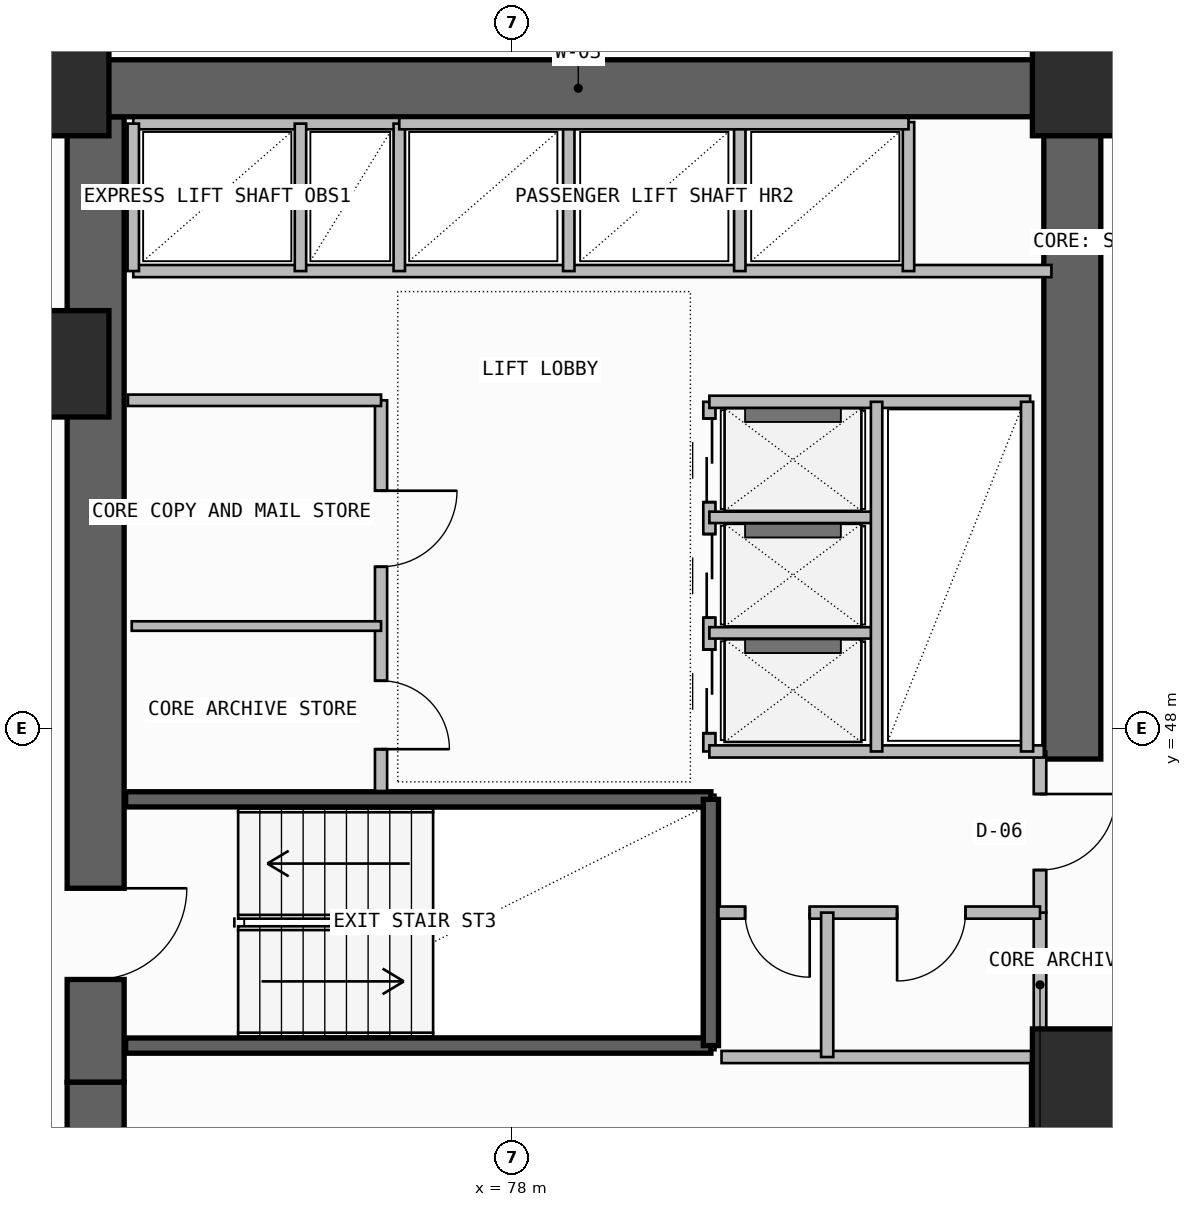
"""IFC4 building model, lengths in metres.
Left out: names, types, materials, properties, quantities, classifications, styles, units other than length and angle.
Written with IfcOpenShell. Run it as: python <this file> out.ifc"""

import sys

from ifc_helpers import new_model, si_unit, direction, frame, frame_2d, origin, origin_2d, place, context, subcontext, project, spatial, rectangle, extrude, element, fill, save


model = new_model("IFC4")
c1 = context("Model", 3, precision=1e-05, world=origin(), true_north=direction((0.0, 1.0)))
c2 = subcontext(c1, "Body", "Model", "MODEL_VIEW")
j1 = project(units=[si_unit("LENGTHUNIT", "METRE"), si_unit("PLANEANGLEUNIT", "RADIAN")], contexts=[c1])
p1 = place(None, origin())
s1 = spatial("IfcSite", under=j1, at=p1, CompositionType="ELEMENT")
p2 = place(p1, origin())
s2 = spatial("IfcBuilding", under=s1, at=p2, CompositionType="ELEMENT")
p3 = place(p2, frame((0.0, 0.0, 182.62)))
s3 = spatial("IfcBuildingStorey", under=s2, at=p3, CompositionType="ELEMENT", Elevation=182.62)
p4 = place(p3, frame((72.525, 35.5, -0.26), z_axis=(0.0, 0.0, 1.0), x_axis=(0.0, 1.0, 0.0)))
e1 = element("IfcWall", 1, at=p4, inside=s3, PredefinedType="SHEAR", context=c2, shape_type="SweptSolid", body=[
    extrude(rectangle(XDim=7.85, YDim=0.75, at=frame_2d((3.925, 0.0))), origin(), (0.0, 0.0, 1.0), 3.52),
])
p5 = place(p4, frame((1.45, 0.0, 0.26)))
e2 = element("IfcOpeningElement", 2, at=p5, cuts=e1, PredefinedType="OPENING", context=c2, shape_type="SweptSolid", body=[
    extrude(rectangle(XDim=1.2, YDim=2.2, at=frame_2d((0.6, 1.1))), frame((0.0, 0.385, 0.0), z_axis=(0.0, -1.0, 0.0), x_axis=(1.0, 0.0, 0.0)), (0.0, 0.0, 1.0), 0.77),
])
p6 = place(p3, frame((72.525, 43.35, -0.26), z_axis=(0.0, 0.0, 1.0), x_axis=(0.0, 1.0, 0.0)))
e3 = element("IfcWall", 3, at=p6, inside=s3, PredefinedType="SHEAR", context=c2, shape_type="SweptSolid", body=[
    extrude(rectangle(XDim=12.7, YDim=0.75, at=frame_2d((6.35, 0.0))), origin(), (0.0, 0.0, 1.0), 3.52),
])
p7 = place(p6, frame((1.35, 0.0, 0.26)))
e4 = element("IfcOpeningElement", 4, at=p7, cuts=e3, PredefinedType="OPENING", context=c2, shape_type="SweptSolid", body=[
    extrude(rectangle(XDim=1.2, YDim=2.2, at=frame_2d((0.6, 1.1))), frame((0.0, 0.385, 0.0), z_axis=(0.0, -1.0, 0.0), x_axis=(1.0, 0.0, 0.0)), (0.0, 0.0, 1.0), 0.77),
])
p8 = place(p3, frame((72.0, 56.425, -0.26), z_axis=(0.0, 0.0, 1.0), x_axis=(1.0, 0.0, 0.0)))
e5 = element("IfcWall", 5, at=p8, inside=s3, PredefinedType="SHEAR", context=c2, shape_type="SweptSolid", body=[
    extrude(rectangle(XDim=13.75, YDim=0.75, at=frame_2d((6.875, 0.0))), origin(), (0.0, 0.0, 1.0), 3.52),
])
p9 = place(p3, frame((85.375, 47.6, -0.26), z_axis=(0.0, 0.0, 1.0), x_axis=(0.0, 1.0, 0.0)))
e6 = element("IfcWall", 6, at=p9, inside=s3, PredefinedType="SHEAR", context=c2, shape_type="SweptSolid", body=[
    extrude(rectangle(XDim=8.45, YDim=0.75, at=frame_2d((4.225, 0.0))), origin(), (0.0, 0.0, 1.0), 3.52),
])
for number, where, z_axis, x_axis in (
    (7, (85.55, 43.35, 0.0), (0.0, 0.0, 1.0), (1.0, 0.0, 0.0)),
    (8, (72.0, 52.8, 0.0), (0.0, 0.0, 1.0), (1.0, 0.0, 0.0)),
    (9, (72.0, 56.5, 0.0), (0.0, 0.0, 1.0), (1.0, 0.0, 0.0)),
    (10, (85.55, 56.5, 0.0), (0.0, 0.0, 1.0), (1.0, 0.0, 0.0)),
):
    element("IfcColumn", number, at=place(p3, frame(where, z_axis=z_axis, x_axis=x_axis)), inside=s3, PredefinedType="COLUMN", context=c2, shape_type="SweptSolid", body=[
        extrude(rectangle(XDim=1.4, YDim=1.4, at=origin_2d()), origin(), (0.0, 0.0, 1.0), 3.52),
    ])
p10 = place(p3, frame((84.92, 38.85, 0.0), z_axis=(0.0, 0.0, 1.0), x_axis=(0.0, 1.0, 0.0)))
e11 = element("IfcWall", 11, at=p10, inside=s3, PredefinedType="SOLIDWALL", context=c2, shape_type="SweptSolid", body=[
    extrude(rectangle(XDim=4.83, YDim=0.2, at=frame_2d((2.415, 0.0))), origin(), (0.0, 0.0, 1.0), 3.26),
])
p11 = place(p10, frame((1.25, 0.0, 0.0)))
e12 = element("IfcOpeningElement", 12, at=p11, cuts=e11, PredefinedType="OPENING", context=c2, shape_type="SweptSolid", body=[
    extrude(rectangle(XDim=1.1, YDim=2.2, at=frame_2d((0.55, 1.1))), frame((0.0, 0.11, 0.0), z_axis=(0.0, -1.0, 0.0), x_axis=(1.0, 0.0, 0.0)), (0.0, 0.0, 1.0), 0.22),
])
for number, where, z_axis, x_axis in (
    (13, (72.92, 43.83, -0.26), (0.0, 0.0, 1.0), (1.0, 0.0, 0.0)),
    (14, (72.92, 47.07, -0.26), (0.0, 0.0, 1.0), (1.0, 0.0, 0.0)),
):
    element("IfcWall", number, at=place(p3, frame(where, z_axis=z_axis, x_axis=x_axis)), inside=s3, PredefinedType="SOLIDWALL", context=c2, shape_type="SweptSolid", body=[
        extrude(rectangle(XDim=7.7, YDim=0.2, at=frame_2d((3.85, 0.0))), origin(), (0.0, 0.0, 1.0), 3.52),
    ])
p12 = place(p3, frame((80.62, 43.83, -0.26), z_axis=(0.0, 0.0, 1.0), x_axis=(0.0, 1.0, 0.0)))
e15 = element("IfcWall", 15, at=p12, inside=s3, PredefinedType="SOLIDWALL", context=c2, shape_type="SweptSolid", body=[
    extrude(rectangle(XDim=3.24, YDim=0.2, at=frame_2d((1.62, 0.0))), origin(), (0.0, 0.0, 1.0), 3.52),
])
p13 = place(p3, frame((84.95, 43.68, 0.0), z_axis=(0.0, 0.0, 1.0), x_axis=(0.0, 1.0, 0.0)))
e16 = element("IfcWall", 16, at=p13, inside=s3, PredefinedType="PLUMBINGWALL", context=c2, shape_type="SweptSolid", body=[
    extrude(rectangle(XDim=1.9, YDim=0.165, at=frame_2d((0.95, 0.0))), origin(), (0.0, 0.0, 1.0), 3.26),
])
p14 = place(p3, frame((84.95, 45.58, 0.0), z_axis=(0.0, 0.0, 1.0), x_axis=(0.0, 1.0, 0.0)))
e17 = element("IfcWall", 17, at=p14, inside=s3, PredefinedType="PARTITIONING", context=c2, shape_type="SweptSolid", body=[
    extrude(rectangle(XDim=2.12, YDim=0.165, at=frame_2d((1.06, 0.0))), origin(), (0.0, 0.0, 1.0), 3.26),
])
p15 = place(p14, frame((0.56, 0.0, 0.0)))
e18 = element("IfcOpeningElement", 18, at=p15, cuts=e17, PredefinedType="OPENING", context=c2, shape_type="SweptSolid", body=[
    extrude(rectangle(XDim=1.0, YDim=2.2, at=frame_2d((0.5, 1.1))), frame((0.0, 0.093, 0.0), z_axis=(0.0, -1.0, 0.0), x_axis=(1.0, 0.0, 0.0)), (0.0, 0.0, 1.0), 0.185),
])
p16 = place(p3, frame((80.72, 45.58, 0.0), z_axis=(0.0, 0.0, 1.0), x_axis=(1.0, 0.0, 0.0)))
e19 = element("IfcWall", 19, at=p16, inside=s3, PredefinedType="PLUMBINGWALL", context=c2, shape_type="SweptSolid", body=[
    extrude(rectangle(XDim=4.23, YDim=0.16, at=frame_2d((2.115, 0.0))), origin(), (0.0, 0.0, 1.0), 3.26),
])
p17 = place(p16, frame((0.35, 0.0, 0.0)))
e20 = element("IfcOpeningElement", 20, at=p17, cuts=e19, PredefinedType="OPENING", context=c2, shape_type="SweptSolid", body=[
    extrude(rectangle(XDim=0.85, YDim=2.05, at=frame_2d((0.425, 1.025))), frame((0.0, 0.09, 0.0), z_axis=(0.0, -1.0, 0.0), x_axis=(1.0, 0.0, 0.0)), (0.0, 0.0, 1.0), 0.18),
])
p18 = place(p16, frame((2.35, 0.0, 0.0)))
e21 = element("IfcOpeningElement", 21, at=p18, cuts=e19, PredefinedType="OPENING", context=c2, shape_type="SweptSolid", body=[
    extrude(rectangle(XDim=0.9, YDim=2.1, at=frame_2d((0.45, 1.05))), frame((0.0, 0.09, 0.0), z_axis=(0.0, -1.0, 0.0), x_axis=(1.0, 0.0, 0.0)), (0.0, 0.0, 1.0), 0.18),
])
p19 = place(p3, frame((80.76, 43.68, 0.0), z_axis=(0.0, 0.0, 1.0), x_axis=(1.0, 0.0, 0.0)))
e22 = element("IfcWall", 22, at=p19, inside=s3, PredefinedType="PLUMBINGWALL", context=c2, shape_type="SweptSolid", body=[
    extrude(rectangle(XDim=4.19, YDim=0.16, at=frame_2d((2.095, 0.0))), origin(), (0.0, 0.0, 1.0), 3.26),
])
p20 = place(p3, frame((82.15, 43.68, 0.0), z_axis=(0.0, 0.0, 1.0), x_axis=(0.0, 1.0, 0.0)))
e23 = element("IfcWall", 23, at=p20, inside=s3, PredefinedType="PLUMBINGWALL", context=c2, shape_type="SweptSolid", body=[
    extrude(rectangle(XDim=1.9, YDim=0.16, at=frame_2d((0.95, 0.0))), origin(), (0.0, 0.0, 1.0), 3.26),
])
p21 = place(p3, frame((76.28, 47.18, 0.0), z_axis=(0.0, 0.0, 1.0), x_axis=(0.0, 1.0, 0.0)))
e24 = element("IfcWall", 24, at=p21, inside=s3, PredefinedType="SOLIDWALL", context=c2, shape_type="SweptSolid", body=[
    extrude(rectangle(XDim=5.14, YDim=0.16, at=frame_2d((2.57, 0.0))), origin(), (0.0, 0.0, 1.0), 3.26),
])
p22 = place(p21, frame((0.55, 0.0, 0.0)))
e25 = element("IfcOpeningElement", 25, at=p22, cuts=e24, PredefinedType="OPENING", context=c2, shape_type="SweptSolid", body=[
    extrude(rectangle(XDim=0.9, YDim=2.1, at=frame_2d((0.45, 1.05))), frame((0.0, 0.09, 0.0), z_axis=(0.0, -1.0, 0.0), x_axis=(1.0, 0.0, 0.0)), (0.0, 0.0, 1.0), 0.18),
])
p23 = place(p21, frame((2.95, 0.0, 0.0)))
e26 = element("IfcOpeningElement", 26, at=p23, cuts=e24, PredefinedType="OPENING", context=c2, shape_type="SweptSolid", body=[
    extrude(rectangle(XDim=1.0, YDim=2.2, at=frame_2d((0.5, 1.1))), frame((0.0, 0.09, 0.0), z_axis=(0.0, -1.0, 0.0), x_axis=(1.0, 0.0, 0.0)), (0.0, 0.0, 1.0), 0.18),
])
p24 = place(p3, frame((72.95, 52.32, 0.0), z_axis=(0.0, 0.0, 1.0), x_axis=(1.0, 0.0, 0.0)))
e27 = element("IfcWall", 27, at=p24, inside=s3, PredefinedType="SOLIDWALL", context=c2, shape_type="SweptSolid", body=[
    extrude(rectangle(XDim=3.33, YDim=0.15, at=frame_2d((1.665, 0.0))), origin(), (0.0, 0.0, 1.0), 3.26),
])
p25 = place(p3, frame((73.0, 49.35, 0.0), z_axis=(0.0, 0.0, 1.0), x_axis=(1.0, 0.0, 0.0)))
e28 = element("IfcWall", 28, at=p25, inside=s3, PredefinedType="PARTITIONING", context=c2, shape_type="SweptSolid", body=[
    extrude(rectangle(XDim=3.28, YDim=0.125, at=frame_2d((1.64, 0.0))), origin(), (0.0, 0.0, 1.0), 3.26),
])
p26 = place(p3, frame((80.6, 47.7, 0.0), z_axis=(0.0, 0.0, 1.0), x_axis=(0.0, 1.0, 0.0)))
e29 = element("IfcWall", 29, at=p26, inside=s3, PredefinedType="SOLIDWALL", context=c2, shape_type="SweptSolid", body=[
    extrude(rectangle(XDim=4.6, YDim=0.16, at=frame_2d((2.3, 0.0))), origin(), (0.0, 0.0, 1.0), 3.26),
])
p27 = place(p26, frame((0.24, 0.0, 0.0)))
e30 = element("IfcOpeningElement", 30, at=p27, cuts=e29, PredefinedType="OPENING", context=c2, shape_type="SweptSolid", body=[
    extrude(rectangle(XDim=1.1, YDim=2.25, at=frame_2d((0.55, 1.125))), frame((0.0, 0.09, 0.0), z_axis=(0.0, -1.0, 0.0), x_axis=(1.0, 0.0, 0.0)), (0.0, 0.0, 1.0), 0.18),
])
p28 = place(p26, frame((1.76, 0.0, 0.0)))
e31 = element("IfcOpeningElement", 31, at=p28, cuts=e29, PredefinedType="OPENING", context=c2, shape_type="SweptSolid", body=[
    extrude(rectangle(XDim=1.1, YDim=2.25, at=frame_2d((0.55, 1.125))), frame((0.0, 0.09, 0.0), z_axis=(0.0, -1.0, 0.0), x_axis=(1.0, 0.0, 0.0)), (0.0, 0.0, 1.0), 0.18),
])
p29 = place(p26, frame((3.28, 0.0, 0.0)))
e32 = element("IfcOpeningElement", 32, at=p29, cuts=e29, PredefinedType="OPENING", context=c2, shape_type="SweptSolid", body=[
    extrude(rectangle(XDim=1.1, YDim=2.25, at=frame_2d((0.55, 1.125))), frame((0.0, 0.09, 0.0), z_axis=(0.0, -1.0, 0.0), x_axis=(1.0, 0.0, 0.0)), (0.0, 0.0, 1.0), 0.18),
])
p30 = place(p3, frame((80.6, 47.7, 0.0), z_axis=(0.0, 0.0, 1.0), x_axis=(1.0, 0.0, 0.0)))
e33 = element("IfcWall", 33, at=p30, inside=s3, PredefinedType="SOLIDWALL", context=c2, shape_type="SweptSolid", body=[
    extrude(rectangle(XDim=4.4, YDim=0.16, at=frame_2d((2.2, 0.0))), origin(), (0.0, 0.0, 1.0), 3.26),
])
p31 = place(p3, frame((80.6, 52.3, 0.0), z_axis=(0.0, 0.0, 1.0), x_axis=(1.0, 0.0, 0.0)))
e34 = element("IfcWall", 34, at=p31, inside=s3, PredefinedType="SOLIDWALL", context=c2, shape_type="SweptSolid", body=[
    extrude(rectangle(XDim=4.22, YDim=0.16, at=frame_2d((2.11, 0.0))), origin(), (0.0, 0.0, 1.0), 3.26),
])
for number, where, z_axis, x_axis in (
    (35, (80.6, 49.26, 0.0), (0.0, 0.0, 1.0), (1.0, 0.0, 0.0)),
    (36, (80.6, 50.78, 0.0), (0.0, 0.0, 1.0), (1.0, 0.0, 0.0)),
):
    element("IfcWall", number, at=place(p3, frame(where, z_axis=z_axis, x_axis=x_axis)), inside=s3, PredefinedType="PLUMBINGWALL", context=c2, shape_type="SweptSolid", body=[
        extrude(rectangle(XDim=2.2, YDim=0.15, at=frame_2d((1.1, 0.0))), origin(), (0.0, 0.0, 1.0), 3.26),
    ])
p32 = place(p3, frame((82.8, 47.7, 0.0), z_axis=(0.0, 0.0, 1.0), x_axis=(0.0, 1.0, 0.0)))
e37 = element("IfcWall", 37, at=p32, inside=s3, PredefinedType="PLUMBINGWALL", context=c2, shape_type="SweptSolid", body=[
    extrude(rectangle(XDim=4.6, YDim=0.15, at=frame_2d((2.3, 0.0))), origin(), (0.0, 0.0, 1.0), 3.26),
])
p33 = place(p3, frame((84.78, 47.7, 0.0), z_axis=(0.0, 0.0, 1.0), x_axis=(0.0, 1.0, 0.0)))
e38 = element("IfcWall", 38, at=p33, inside=s3, PredefinedType="SOLIDWALL", context=c2, shape_type="SweptSolid", body=[
    extrude(rectangle(XDim=4.6, YDim=0.16, at=frame_2d((2.3, 0.0))), origin(), (0.0, 0.0, 1.0), 3.26),
])
p34 = place(p3, frame((73.02, 54.02, 0.0), z_axis=(0.0, 0.0, 1.0), x_axis=(1.0, 0.0, 0.0)))
e39 = element("IfcWall", 39, at=p34, inside=s3, PredefinedType="SOLIDWALL", context=c2, shape_type="SweptSolid", body=[
    extrude(rectangle(XDim=12.08, YDim=0.16, at=frame_2d((6.04, 0.0))), origin(), (0.0, 0.0, 1.0), 3.26),
])
p35 = place(p3, frame((73.02, 55.96, 0.0), z_axis=(0.0, 0.0, 1.0), x_axis=(1.0, 0.0, 0.0)))
e40 = element("IfcWall", 40, at=p35, inside=s3, PredefinedType="SOLIDWALL", context=c2, shape_type="SweptSolid", body=[
    extrude(rectangle(XDim=3.5, YDim=0.15, at=frame_2d((1.75, 0.0))), origin(), (0.0, 0.0, 1.0), 3.26),
])
p36 = place(p3, frame((73.02, 54.02, 0.0), z_axis=(0.0, 0.0, 1.0), x_axis=(0.0, 1.0, 0.0)))
e41 = element("IfcWall", 41, at=p36, inside=s3, PredefinedType="PLUMBINGWALL", context=c2, shape_type="SweptSolid", body=[
    extrude(rectangle(XDim=1.94, YDim=0.15, at=frame_2d((0.97, 0.0))), origin(), (0.0, 0.0, 1.0), 3.26),
])
p37 = place(p3, frame((76.52, 54.02, 0.0), z_axis=(0.0, 0.0, 1.0), x_axis=(0.0, 1.0, 0.0)))
e42 = element("IfcWall", 42, at=p37, inside=s3, PredefinedType="SOLIDWALL", context=c2, shape_type="SweptSolid", body=[
    extrude(rectangle(XDim=1.94, YDim=0.15, at=frame_2d((0.97, 0.0))), origin(), (0.0, 0.0, 1.0), 3.26),
])
p38 = place(p3, frame((75.22, 54.02, 0.0), z_axis=(0.0, 0.0, 1.0), x_axis=(0.0, 1.0, 0.0)))
e43 = element("IfcWall", 43, at=p38, inside=s3, PredefinedType="PLUMBINGWALL", context=c2, shape_type="SweptSolid", body=[
    extrude(rectangle(XDim=1.94, YDim=0.15, at=frame_2d((0.97, 0.0))), origin(), (0.0, 0.0, 1.0), 3.26),
])
for number, where, z_axis, x_axis in (
    (44, (78.75, 54.02, 0.0), (0.0, 0.0, 1.0), (0.0, 1.0, 0.0)),
    (45, (81.0, 54.02, 0.0), (0.0, 0.0, 1.0), (0.0, 1.0, 0.0)),
):
    element("IfcWall", number, at=place(p3, frame(where, z_axis=z_axis, x_axis=x_axis)), inside=s3, PredefinedType="PLUMBINGWALL", context=c2, shape_type="SweptSolid", body=[
        extrude(rectangle(XDim=1.96, YDim=0.15, at=frame_2d((0.98, 0.0))), origin(), (0.0, 0.0, 1.0), 3.26),
    ])
p39 = place(p3, frame((83.22, 54.02, 0.0), z_axis=(0.0, 0.0, 1.0), x_axis=(0.0, 1.0, 0.0)))
e46 = element("IfcWall", 46, at=p39, inside=s3, PredefinedType="SOLIDWALL", context=c2, shape_type="SweptSolid", body=[
    extrude(rectangle(XDim=1.96, YDim=0.15, at=frame_2d((0.98, 0.0))), origin(), (0.0, 0.0, 1.0), 3.26),
])
p40 = place(p3, frame((76.52, 55.96, 0.0), z_axis=(0.0, 0.0, 1.0), x_axis=(1.0, 0.0, 0.0)))
e47 = element("IfcWall", 47, at=p40, inside=s3, PredefinedType="SOLIDWALL", context=c2, shape_type="SweptSolid", body=[
    extrude(rectangle(XDim=6.7, YDim=0.15, at=frame_2d((3.35, 0.0))), origin(), (0.0, 0.0, 1.0), 3.26),
])
p41 = place(p7, frame((1.2, 0.0, 0.0), z_axis=(0.0, 0.0, 1.0), x_axis=(-1.0, 0.0, 0.0)))
e48 = element("IfcDoor", 48, at=p41, inside=s3, OperationType="SINGLE_SWING_LEFT", PredefinedType="USERDEFINED", context=c2, shape_type="SweptSolid", body=[
    extrude(rectangle(XDim=1.2, YDim=2.2, at=frame_2d((0.6, 1.1))), frame((0.0, 0.025, 0.0), z_axis=(0.0, -1.0, 0.0), x_axis=(1.0, 0.0, 0.0)), (0.0, 0.0, 1.0), 0.05),
])
fill(e4, e48)
p42 = place(p15, frame((1.0, 0.0, 0.0), z_axis=(0.0, 0.0, 1.0), x_axis=(-1.0, 0.0, 0.0)))
e49 = element("IfcDoor", 49, at=p42, inside=s3, OperationType="SINGLE_SWING_LEFT", PredefinedType="DOOR", context=c2, shape_type="SweptSolid", body=[
    extrude(rectangle(XDim=1.0, YDim=2.2, at=frame_2d((0.5, 1.1))), frame((0.0, 0.025, 0.0), z_axis=(0.0, -1.0, 0.0), x_axis=(1.0, 0.0, 0.0)), (0.0, 0.0, 1.0), 0.05),
])
fill(e18, e49)
p43 = place(p17, frame((0.85, 0.0, 0.0), z_axis=(0.0, 0.0, 1.0), x_axis=(-1.0, 0.0, 0.0)))
e50 = element("IfcDoor", 50, at=p43, inside=s3, OperationType="SINGLE_SWING_LEFT", PredefinedType="DOOR", context=c2, shape_type="SweptSolid", body=[
    extrude(rectangle(XDim=0.85, YDim=2.05, at=frame_2d((0.425, 1.025))), frame((0.0, 0.025, 0.0), z_axis=(0.0, -1.0, 0.0), x_axis=(1.0, 0.0, 0.0)), (0.0, 0.0, 1.0), 0.05),
])
fill(e20, e50)
p44 = place(p18, frame((0.9, 0.0, 0.0), z_axis=(0.0, 0.0, 1.0), x_axis=(-1.0, 0.0, 0.0)))
e51 = element("IfcDoor", 51, at=p44, inside=s3, OperationType="SINGLE_SWING_RIGHT", PredefinedType="DOOR", context=c2, shape_type="SweptSolid", body=[
    extrude(rectangle(XDim=0.9, YDim=2.1, at=frame_2d((0.45, 1.05))), frame((0.0, 0.025, 0.0), z_axis=(0.0, -1.0, 0.0), x_axis=(1.0, 0.0, 0.0)), (0.0, 0.0, 1.0), 0.05),
])
fill(e21, e51)
p45 = place(p22, frame((0.9, 0.0, 0.0), z_axis=(0.0, 0.0, 1.0), x_axis=(-1.0, 0.0, 0.0)))
e52 = element("IfcDoor", 52, at=p45, inside=s3, OperationType="SINGLE_SWING_RIGHT", PredefinedType="DOOR", context=c2, shape_type="SweptSolid", body=[
    extrude(rectangle(XDim=0.9, YDim=2.1, at=frame_2d((0.45, 1.05))), frame((0.0, 0.025, 0.0), z_axis=(0.0, -1.0, 0.0), x_axis=(1.0, 0.0, 0.0)), (0.0, 0.0, 1.0), 0.05),
])
fill(e25, e52)
p46 = place(p23, frame((1.0, 0.0, 0.0), z_axis=(0.0, 0.0, 1.0), x_axis=(-1.0, 0.0, 0.0)))
e53 = element("IfcDoor", 53, at=p46, inside=s3, OperationType="SINGLE_SWING_LEFT", PredefinedType="DOOR", context=c2, shape_type="SweptSolid", body=[
    extrude(rectangle(XDim=1.0, YDim=2.2, at=frame_2d((0.5, 1.1))), frame((0.0, 0.025, 0.0), z_axis=(0.0, -1.0, 0.0), x_axis=(1.0, 0.0, 0.0)), (0.0, 0.0, 1.0), 0.05),
])
fill(e26, e53)
p47 = place(p27, frame((1.1, 0.0, 0.0), z_axis=(0.0, 0.0, 1.0), x_axis=(-1.0, 0.0, 0.0)))
e54 = element("IfcDoor", 54, at=p47, inside=s3, OperationType="DOUBLE_DOOR_SLIDING", PredefinedType="DOOR", context=c2, shape_type="SweptSolid", body=[
    extrude(rectangle(XDim=1.1, YDim=2.25, at=frame_2d((0.55, 1.125))), frame((0.0, 0.025, 0.0), z_axis=(0.0, -1.0, 0.0), x_axis=(1.0, 0.0, 0.0)), (0.0, 0.0, 1.0), 0.05),
])
fill(e30, e54)
p48 = place(p28, frame((1.1, 0.0, 0.0), z_axis=(0.0, 0.0, 1.0), x_axis=(-1.0, 0.0, 0.0)))
e55 = element("IfcDoor", 55, at=p48, inside=s3, OperationType="DOUBLE_DOOR_SLIDING", PredefinedType="DOOR", context=c2, shape_type="SweptSolid", body=[
    extrude(rectangle(XDim=1.1, YDim=2.25, at=frame_2d((0.55, 1.125))), frame((0.0, 0.025, 0.0), z_axis=(0.0, -1.0, 0.0), x_axis=(1.0, 0.0, 0.0)), (0.0, 0.0, 1.0), 0.05),
])
fill(e31, e55)
p49 = place(p29, frame((1.1, 0.0, 0.0), z_axis=(0.0, 0.0, 1.0), x_axis=(-1.0, 0.0, 0.0)))
e56 = element("IfcDoor", 56, at=p49, inside=s3, OperationType="DOUBLE_DOOR_SLIDING", PredefinedType="DOOR", context=c2, shape_type="SweptSolid", body=[
    extrude(rectangle(XDim=1.1, YDim=2.25, at=frame_2d((0.55, 1.125))), frame((0.0, 0.025, 0.0), z_axis=(0.0, -1.0, 0.0), x_axis=(1.0, 0.0, 0.0)), (0.0, 0.0, 1.0), 0.05),
])
fill(e32, e56)
save(model, sys.argv[1])
